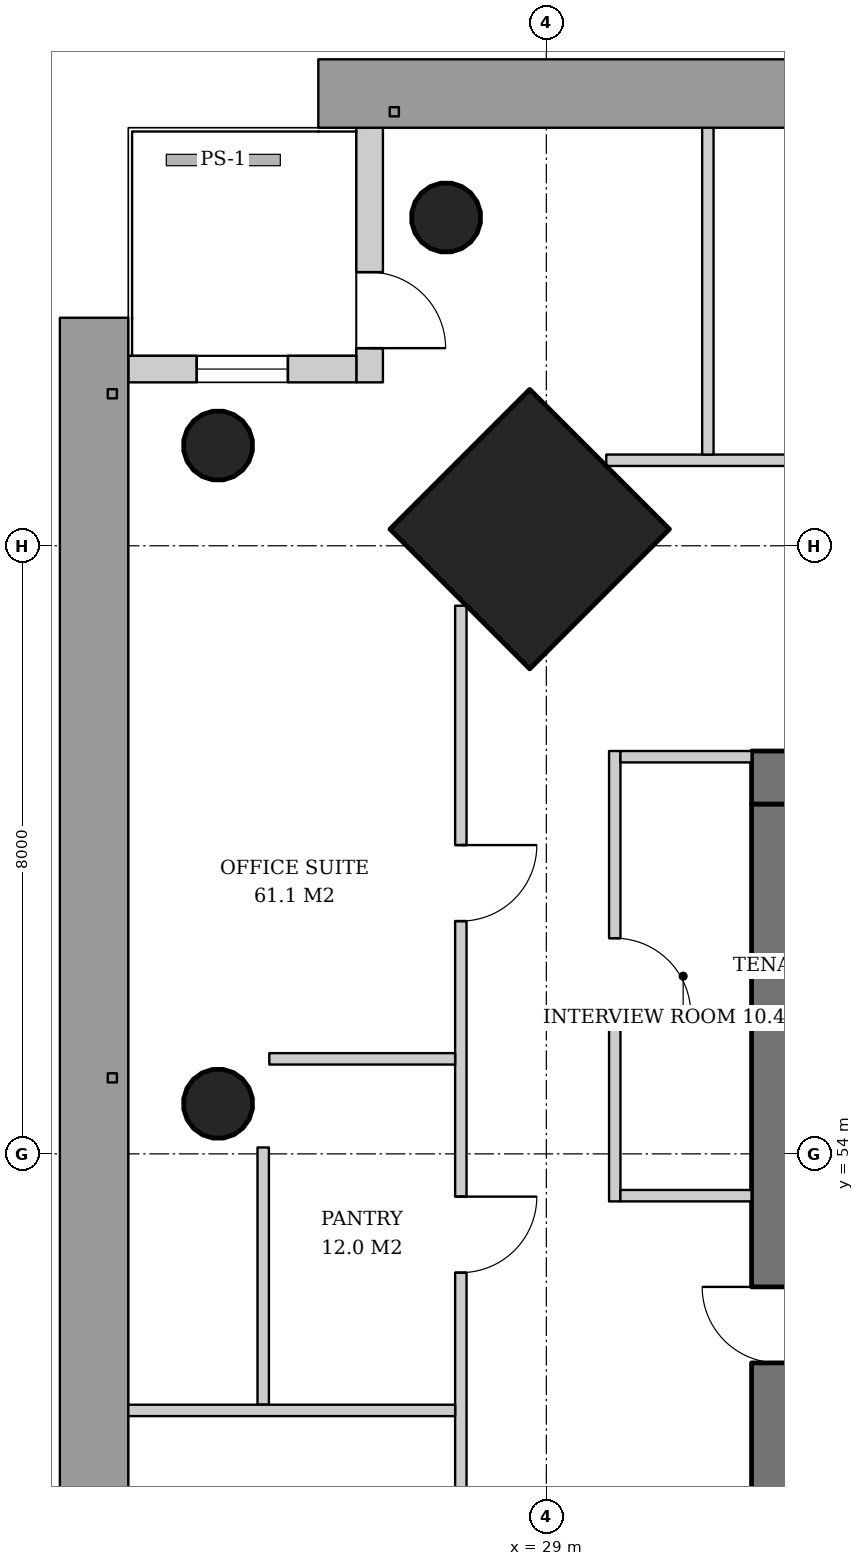
"""IFC4 building model, lengths in metres.
Left out: names, types, materials, properties, quantities, classifications, styles, units other than length and angle.
Written with IfcOpenShell. Run it as: python <this file> out.ifc"""

import sys

from ifc_helpers import new_model, si_unit, direction, frame, frame_2d, origin, origin_2d, place, context, subcontext, project, spatial, rectangle, hollow_circle, extrude, element, fill, save


model = new_model("IFC4")
c1 = context("Model", 3, precision=1e-05, world=origin(), true_north=direction((0.0, 1.0)))
c2 = subcontext(c1, "Body", "Model", "MODEL_VIEW")
j1 = project(units=[si_unit("LENGTHUNIT", "METRE"), si_unit("PLANEANGLEUNIT", "RADIAN")], contexts=[c1])
p1 = place(None, origin())
s1 = spatial("IfcSite", under=j1, at=p1, CompositionType="ELEMENT")
p2 = place(p1, origin())
s2 = spatial("IfcBuilding", under=s1, at=p2, CompositionType="ELEMENT")
p3 = place(p2, frame((0.0, 0.0, 135.0)))
s3 = spatial("IfcBuildingStorey", under=s2, at=p3, CompositionType="ELEMENT", Elevation=135.0)
p4 = place(p3, frame((28.743, 62.257, 0.0), z_axis=(0.031898107953, -0.031898107953, 0.998981992539), x_axis=(0.707106781187, 0.707106781187, 0.0)))
e1 = element("IfcColumn", 1, at=p4, inside=s3, PredefinedType="COLUMN", context=c2, shape_type="SweptSolid", body=[
    extrude(rectangle(XDim=2.6, YDim=2.6, at=origin_2d()), origin(), (0.0, 0.0, 1.0), 3.804),
])
for number, where, z_axis, x_axis in (
    (2, (27.643, 66.357, 0.0), (0.032, -0.032, 0.999), (0.707, 0.707, 0.0)),
    (3, (24.643, 63.357, 0.0), (0.032, -0.032, 0.999), (0.707, 0.707, 0.0)),
):
    element("IfcColumn", number, at=place(p3, frame(where, z_axis=z_axis, x_axis=x_axis)), inside=s3, PredefinedType="COLUMN", context=c2, shape_type="SweptSolid", body=[
        extrude(hollow_circle(Radius=0.457, WallThickness=0.03, at=origin_2d()), origin(), (0.0, 0.0, 1.0), 3.804),
    ])
p5 = place(p3, frame((24.643, 54.678, 0.0), z_axis=(0.031974442509, -0.015923015547, 0.999361842679), x_axis=(0.445775033553, 0.895145027055, 0.0)))
e4 = element("IfcColumn", 4, at=p5, inside=s3, PredefinedType="COLUMN", context=c2, shape_type="SweptSolid", body=[
    extrude(hollow_circle(Radius=0.457, WallThickness=0.03, at=origin_2d()), origin(), (0.0, 0.0, 1.0), 3.802),
])
p6 = place(p3, frame((31.7, 58.95, 0.0), z_axis=(0.0, 0.0, 1.0), x_axis=(1.0, 0.0, 0.0)))
e5 = element("IfcWall", 5, at=p6, inside=s3, PredefinedType="SHEAR", context=c2, shape_type="SweptSolid", body=[
    extrude(rectangle(XDim=26.6, YDim=0.7, at=frame_2d((13.3, 0.0))), origin(), (0.0, 0.0, 1.0), 3.8),
])
p7 = place(p6, frame((17.94, 0.0, 0.0)))
e6 = element("IfcOpeningElement", 6, at=p7, cuts=e5, PredefinedType="OPENING", context=c2, shape_type="SweptSolid", body=[
    extrude(rectangle(XDim=1.0, YDim=2.1, at=frame_2d((0.5, 1.05))), frame((0.0, 0.36, 0.0), z_axis=(0.0, -1.0, 0.0), x_axis=(1.0, 0.0, 0.0)), (0.0, 0.0, 1.0), 0.72),
])
p8 = place(p6, frame((5.825, 0.0, 0.0)))
e7 = element("IfcOpeningElement", 7, at=p8, cuts=e5, PredefinedType="OPENING", context=c2, shape_type="SweptSolid", body=[
    extrude(rectangle(XDim=1.0, YDim=2.1, at=frame_2d((0.5, 1.05))), frame((0.0, 0.36, 0.0), z_axis=(0.0, -1.0, 0.0), x_axis=(1.0, 0.0, 0.0)), (0.0, 0.0, 1.0), 0.72),
])
p9 = place(p6, frame((1.073, 0.0, 0.0)))
e8 = element("IfcOpeningElement", 8, at=p9, cuts=e5, PredefinedType="OPENING", context=c2, shape_type="SweptSolid", body=[
    extrude(rectangle(XDim=1.0, YDim=2.1, at=frame_2d((0.5, 1.05))), frame((0.0, 0.36, 0.0), z_axis=(0.0, -1.0, 0.0), x_axis=(1.0, 0.0, 0.0)), (0.0, 0.0, 1.0), 0.72),
])
p10 = place(p6, frame((2.611, 0.0, 0.0)))
e9 = element("IfcOpeningElement", 9, at=p10, cuts=e5, PredefinedType="OPENING", context=c2, shape_type="SweptSolid", body=[
    extrude(rectangle(XDim=1.0, YDim=2.1, at=frame_2d((0.5, 1.05))), frame((0.0, 0.36, 0.0), z_axis=(0.0, -1.0, 0.0), x_axis=(1.0, 0.0, 0.0)), (0.0, 0.0, 1.0), 0.72),
])
p11 = place(p6, frame((4.187, 0.0, 0.0)))
e10 = element("IfcOpeningElement", 10, at=p11, cuts=e5, PredefinedType="OPENING", context=c2, shape_type="SweptSolid", body=[
    extrude(rectangle(XDim=1.0, YDim=2.1, at=frame_2d((0.5, 1.05))), frame((0.0, 0.36, 0.0), z_axis=(0.0, -1.0, 0.0), x_axis=(1.0, 0.0, 0.0)), (0.0, 0.0, 1.0), 0.72),
])
p12 = place(p6, frame((8.44, 0.0, 0.0)))
e11 = element("IfcOpeningElement", 11, at=p12, cuts=e5, PredefinedType="OPENING", context=c2, shape_type="SweptSolid", body=[
    extrude(rectangle(XDim=1.0, YDim=2.1, at=frame_2d((0.5, 1.05))), frame((0.0, 0.36, 0.0), z_axis=(0.0, -1.0, 0.0), x_axis=(1.0, 0.0, 0.0)), (0.0, 0.0, 1.0), 0.72),
])
p13 = place(p6, frame((13.342, 0.0, 0.0)))
e12 = element("IfcOpeningElement", 12, at=p13, cuts=e5, PredefinedType="OPENING", context=c2, shape_type="SweptSolid", body=[
    extrude(rectangle(XDim=1.0, YDim=2.1, at=frame_2d((0.5, 1.05))), frame((0.0, 0.36, 0.0), z_axis=(0.0, -1.0, 0.0), x_axis=(1.0, 0.0, 0.0)), (0.0, 0.0, 1.0), 0.72),
])
p14 = place(p6, frame((22.4, 0.0, 0.0)))
e13 = element("IfcOpeningElement", 13, at=p14, cuts=e5, PredefinedType="OPENING", context=c2, shape_type="SweptSolid", body=[
    extrude(rectangle(XDim=1.0, YDim=2.1, at=frame_2d((0.5, 1.05))), frame((0.0, 0.36, 0.0), z_axis=(0.0, -1.0, 0.0), x_axis=(1.0, 0.0, 0.0)), (0.0, 0.0, 1.0), 0.72),
])
p15 = place(p3, frame((32.05, 33.4, 0.0), z_axis=(0.0, 0.0, 1.0), x_axis=(0.0, 1.0, 0.0)))
e14 = element("IfcWall", 14, at=p15, inside=s3, PredefinedType="SHEAR", context=c2, shape_type="SweptSolid", body=[
    extrude(rectangle(XDim=25.2, YDim=0.7, at=frame_2d((12.6, 0.0))), origin(), (0.0, 0.0, 1.0), 3.8),
])
p16 = place(p15, frame((11.7, 0.0, 0.0)))
e15 = element("IfcOpeningElement", 15, at=p16, cuts=e14, PredefinedType="OPENING", context=c2, shape_type="SweptSolid", body=[
    extrude(rectangle(XDim=1.8, YDim=2.4, at=frame_2d((0.9, 1.2))), frame((0.0, 0.36, 0.0), z_axis=(0.0, -1.0, 0.0), x_axis=(1.0, 0.0, 0.0)), (0.0, 0.0, 1.0), 0.72),
])
p17 = place(p15, frame((3.6, 0.0, 0.0)))
e16 = element("IfcOpeningElement", 16, at=p17, cuts=e14, PredefinedType="OPENING", context=c2, shape_type="SweptSolid", body=[
    extrude(rectangle(XDim=1.0, YDim=2.1, at=frame_2d((0.5, 1.05))), frame((0.0, 0.36, 0.0), z_axis=(0.0, -1.0, 0.0), x_axis=(1.0, 0.0, 0.0)), (0.0, 0.0, 1.0), 0.72),
])
p18 = place(p15, frame((6.35, 0.0, 0.0)))
e17 = element("IfcOpeningElement", 17, at=p18, cuts=e14, PredefinedType="OPENING", context=c2, shape_type="SweptSolid", body=[
    extrude(rectangle(XDim=1.0, YDim=2.1, at=frame_2d((0.5, 1.05))), frame((0.0, 0.36, 0.0), z_axis=(0.0, -1.0, 0.0), x_axis=(1.0, 0.0, 0.0)), (0.0, 0.0, 1.0), 0.72),
])
p19 = place(p15, frame((9.1, 0.0, 0.0)))
e18 = element("IfcOpeningElement", 18, at=p19, cuts=e14, PredefinedType="OPENING", context=c2, shape_type="SweptSolid", body=[
    extrude(rectangle(XDim=1.0, YDim=2.1, at=frame_2d((0.5, 1.05))), frame((0.0, 0.36, 0.0), z_axis=(0.0, -1.0, 0.0), x_axis=(1.0, 0.0, 0.0)), (0.0, 0.0, 1.0), 0.72),
])
p20 = place(p15, frame((15.1, 0.0, 0.0)))
e19 = element("IfcOpeningElement", 19, at=p20, cuts=e14, PredefinedType="OPENING", context=c2, shape_type="SweptSolid", body=[
    extrude(rectangle(XDim=1.0, YDim=2.1, at=frame_2d((0.5, 1.05))), frame((0.0, 0.36, 0.0), z_axis=(0.0, -1.0, 0.0), x_axis=(1.0, 0.0, 0.0)), (0.0, 0.0, 1.0), 0.72),
])
p21 = place(p15, frame((17.85, 0.0, 0.0)))
e20 = element("IfcOpeningElement", 20, at=p21, cuts=e14, PredefinedType="OPENING", context=c2, shape_type="SweptSolid", body=[
    extrude(rectangle(XDim=1.0, YDim=2.1, at=frame_2d((0.5, 1.05))), frame((0.0, 0.36, 0.0), z_axis=(0.0, -1.0, 0.0), x_axis=(1.0, 0.0, 0.0)), (0.0, 0.0, 1.0), 0.72),
])
p22 = place(p3, frame((26.675, 67.5, 0.0), z_axis=(0.0, 0.0, 1.0), x_axis=(0.0, -1.0, 0.0)))
e21 = element("IfcWall", 21, at=p22, inside=s3, PredefinedType="SOLIDWALL", context=c2, shape_type="SweptSolid", body=[
    extrude(rectangle(XDim=3.35, YDim=0.35, at=frame_2d((1.675, 0.0))), origin(), (0.0, 0.0, 1.0), 3.62),
])
p23 = place(p22, frame((1.9, 0.0, 0.0)))
e22 = element("IfcOpeningElement", 22, at=p23, cuts=e21, PredefinedType="OPENING", context=c2, shape_type="SweptSolid", body=[
    extrude(rectangle(XDim=1.0, YDim=2.4, at=frame_2d((0.5, 1.2))), frame((0.0, 0.185, 0.0), z_axis=(0.0, -1.0, 0.0), x_axis=(1.0, 0.0, 0.0)), (0.0, 0.0, 1.0), 0.37),
])
p24 = place(p3, frame((26.5, 64.325, 0.0), z_axis=(0.0, 0.0, 1.0), x_axis=(-1.0, 0.0, 0.0)))
e23 = element("IfcWall", 23, at=p24, inside=s3, PredefinedType="SOLIDWALL", context=c2, shape_type="SweptSolid", body=[
    extrude(rectangle(XDim=3.0, YDim=0.35, at=frame_2d((1.5, 0.0))), origin(), (0.0, 0.0, 1.0), 3.62),
])
p25 = place(p24, frame((0.9, 0.0, 0.6)))
e24 = element("IfcOpeningElement", 24, at=p25, cuts=e23, PredefinedType="OPENING", context=c2, shape_type="SweptSolid", body=[
    extrude(rectangle(XDim=1.2, YDim=2.55, at=frame_2d((0.6, 1.275))), frame((0.0, 0.185, 0.0), z_axis=(0.0, -1.0, 0.0), x_axis=(1.0, 0.0, 0.0)), (0.0, 0.0, 1.0), 0.37),
])
p26 = place(p3, frame((29.9, 59.3, 0.0), z_axis=(0.0, 0.0, 1.0), x_axis=(0.0, -1.0, 0.0)))
e25 = element("IfcWall", 25, at=p26, inside=s3, PredefinedType="PARTITIONING", context=c2, shape_type="SweptSolid", body=[
    extrude(rectangle(XDim=5.925, YDim=0.15, at=frame_2d((2.962, 0.0))), origin(), (0.0, 0.0, 1.0), 2.72),
])
p27 = place(p26, frame((2.462, 0.0, 0.0)))
e26 = element("IfcOpeningElement", 26, at=p27, cuts=e25, PredefinedType="OPENING", context=c2, shape_type="SweptSolid", body=[
    extrude(rectangle(XDim=1.0, YDim=2.1, at=frame_2d((0.5, 1.05))), frame((0.0, 0.085, 0.0), z_axis=(0.0, -1.0, 0.0), x_axis=(1.0, 0.0, 0.0)), (0.0, 0.0, 1.0), 0.17),
])
for number, where, z_axis, x_axis in (
    (27, (31.7, 59.225, 0.0), (0.0, 0.0, 1.0), (-1.0, 0.0, 0.0)),
    (28, (31.7, 53.45, 0.0), (0.0, 0.0, 1.0), (-1.0, 0.0, 0.0)),
):
    element("IfcWall", number, at=place(p3, frame(where, z_axis=z_axis, x_axis=x_axis)), inside=s3, PredefinedType="PARTITIONING", context=c2, shape_type="SweptSolid", body=[
        extrude(rectangle(XDim=1.725, YDim=0.15, at=frame_2d((0.862, 0.0))), origin(), (0.0, 0.0, 1.0), 3.62),
    ])
p28 = place(p3, frame((60.211, 63.125, 0.0), z_axis=(0.0, 0.0, 1.0), x_axis=(-1.0, 0.0, 0.0)))
e29 = element("IfcWall", 29, at=p28, inside=s3, PredefinedType="PARTITIONING", context=c2, shape_type="SweptSolid", body=[
    extrude(rectangle(XDim=30.423, YDim=0.15, at=frame_2d((15.211, 0.0))), origin(), (0.0, 0.0, 1.0), 2.72),
])
p29 = place(p28, frame((3.149, 0.0, 0.0)))
e30 = element("IfcOpeningElement", 30, at=p29, cuts=e29, PredefinedType="OPENING", context=c2, shape_type="SweptSolid", body=[
    extrude(rectangle(XDim=1.0, YDim=2.1, at=frame_2d((0.5, 1.05))), frame((0.0, 0.085, 0.0), z_axis=(0.0, -1.0, 0.0), x_axis=(1.0, 0.0, 0.0)), (0.0, 0.0, 1.0), 0.17),
])
p30 = place(p28, frame((7.774, 0.0, 0.0)))
e31 = element("IfcOpeningElement", 31, at=p30, cuts=e29, PredefinedType="OPENING", context=c2, shape_type="SweptSolid", body=[
    extrude(rectangle(XDim=1.0, YDim=2.1, at=frame_2d((0.5, 1.05))), frame((0.0, 0.085, 0.0), z_axis=(0.0, -1.0, 0.0), x_axis=(1.0, 0.0, 0.0)), (0.0, 0.0, 1.0), 0.17),
])
p31 = place(p28, frame((12.399, 0.0, 0.0)))
e32 = element("IfcOpeningElement", 32, at=p31, cuts=e29, PredefinedType="OPENING", context=c2, shape_type="SweptSolid", body=[
    extrude(rectangle(XDim=1.0, YDim=2.1, at=frame_2d((0.5, 1.05))), frame((0.0, 0.085, 0.0), z_axis=(0.0, -1.0, 0.0), x_axis=(1.0, 0.0, 0.0)), (0.0, 0.0, 1.0), 0.17),
])
p32 = place(p28, frame((17.024, 0.0, 0.0)))
e33 = element("IfcOpeningElement", 33, at=p32, cuts=e29, PredefinedType="OPENING", context=c2, shape_type="SweptSolid", body=[
    extrude(rectangle(XDim=1.0, YDim=2.1, at=frame_2d((0.5, 1.05))), frame((0.0, 0.085, 0.0), z_axis=(0.0, -1.0, 0.0), x_axis=(1.0, 0.0, 0.0)), (0.0, 0.0, 1.0), 0.17),
])
p33 = place(p28, frame((21.649, 0.0, 0.0)))
e34 = element("IfcOpeningElement", 34, at=p33, cuts=e29, PredefinedType="OPENING", context=c2, shape_type="SweptSolid", body=[
    extrude(rectangle(XDim=1.0, YDim=2.1, at=frame_2d((0.5, 1.05))), frame((0.0, 0.085, 0.0), z_axis=(0.0, -1.0, 0.0), x_axis=(1.0, 0.0, 0.0)), (0.0, 0.0, 1.0), 0.17),
])
p34 = place(p28, frame((26.274, 0.0, 0.0)))
e35 = element("IfcOpeningElement", 35, at=p34, cuts=e29, PredefinedType="OPENING", context=c2, shape_type="SweptSolid", body=[
    extrude(rectangle(XDim=1.0, YDim=2.1, at=frame_2d((0.5, 1.05))), frame((0.0, 0.085, 0.0), z_axis=(0.0, -1.0, 0.0), x_axis=(1.0, 0.0, 0.0)), (0.0, 0.0, 1.0), 0.17),
])
p35 = place(p3, frame((31.125, 63.2, 0.0), z_axis=(0.0, 0.0, 1.0), x_axis=(0.0, 1.0, 0.0)))
e36 = element("IfcWall", 36, at=p35, inside=s3, PredefinedType="PARTITIONING", context=c2, shape_type="SweptSolid", body=[
    extrude(rectangle(XDim=4.34, YDim=0.15, at=frame_2d((2.17, 0.0))), origin(), (0.0, 0.0, 1.0), 2.82),
])
p36 = place(p3, frame((25.275, 54.084, 0.0), z_axis=(0.0, 0.0, 1.0), x_axis=(0.0, -1.0, 0.0)))
e37 = element("IfcWall", 37, at=p36, inside=s3, PredefinedType="PARTITIONING", context=c2, shape_type="SweptSolid", body=[
    extrude(rectangle(XDim=3.384, YDim=0.15, at=frame_2d((1.692, 0.0))), origin(), (0.0, 0.0, 1.0), 2.858),
])
p37 = place(p3, frame((27.875, 61.211, 0.0), z_axis=(0.0, 0.0, 1.0), x_axis=(0.0, -1.0, 0.0)))
e38 = element("IfcWall", 38, at=p37, inside=s3, PredefinedType="PARTITIONING", context=c2, shape_type="SweptSolid", body=[
    extrude(rectangle(XDim=30.423, YDim=0.15, at=frame_2d((15.211, 0.0))), origin(), (0.0, 0.0, 1.0), 2.72),
])
p38 = place(p37, frame((3.149, 0.0, 0.0)))
e39 = element("IfcOpeningElement", 39, at=p38, cuts=e38, PredefinedType="OPENING", context=c2, shape_type="SweptSolid", body=[
    extrude(rectangle(XDim=1.0, YDim=2.1, at=frame_2d((0.5, 1.05))), frame((0.0, 0.085, 0.0), z_axis=(0.0, -1.0, 0.0), x_axis=(1.0, 0.0, 0.0)), (0.0, 0.0, 1.0), 0.17),
])
p39 = place(p37, frame((7.774, 0.0, 0.0)))
e40 = element("IfcOpeningElement", 40, at=p39, cuts=e38, PredefinedType="OPENING", context=c2, shape_type="SweptSolid", body=[
    extrude(rectangle(XDim=1.0, YDim=2.1, at=frame_2d((0.5, 1.05))), frame((0.0, 0.085, 0.0), z_axis=(0.0, -1.0, 0.0), x_axis=(1.0, 0.0, 0.0)), (0.0, 0.0, 1.0), 0.17),
])
p40 = place(p37, frame((12.399, 0.0, 0.0)))
e41 = element("IfcOpeningElement", 41, at=p40, cuts=e38, PredefinedType="OPENING", context=c2, shape_type="SweptSolid", body=[
    extrude(rectangle(XDim=1.0, YDim=2.1, at=frame_2d((0.5, 1.05))), frame((0.0, 0.085, 0.0), z_axis=(0.0, -1.0, 0.0), x_axis=(1.0, 0.0, 0.0)), (0.0, 0.0, 1.0), 0.17),
])
p41 = place(p37, frame((17.124, 0.0, 0.0)))
e42 = element("IfcOpeningElement", 42, at=p41, cuts=e38, PredefinedType="OPENING", context=c2, shape_type="SweptSolid", body=[
    extrude(rectangle(XDim=0.8, YDim=2.1, at=frame_2d((0.4, 1.05))), frame((0.0, 0.085, 0.0), z_axis=(0.0, -1.0, 0.0), x_axis=(1.0, 0.0, 0.0)), (0.0, 0.0, 1.0), 0.17),
])
p42 = place(p37, frame((21.649, 0.0, 0.0)))
e43 = element("IfcOpeningElement", 43, at=p42, cuts=e38, PredefinedType="OPENING", context=c2, shape_type="SweptSolid", body=[
    extrude(rectangle(XDim=1.0, YDim=2.1, at=frame_2d((0.5, 1.05))), frame((0.0, 0.085, 0.0), z_axis=(0.0, -1.0, 0.0), x_axis=(1.0, 0.0, 0.0)), (0.0, 0.0, 1.0), 0.17),
])
p43 = place(p37, frame((26.374, 0.0, 0.0)))
e44 = element("IfcOpeningElement", 44, at=p43, cuts=e38, PredefinedType="OPENING", context=c2, shape_type="SweptSolid", body=[
    extrude(rectangle(XDim=0.8, YDim=2.1, at=frame_2d((0.4, 1.05))), frame((0.0, 0.085, 0.0), z_axis=(0.0, -1.0, 0.0), x_axis=(1.0, 0.0, 0.0)), (0.0, 0.0, 1.0), 0.17),
])
p44 = place(p3, frame((27.8, 55.25, 0.0), z_axis=(0.0, 0.0, 1.0), x_axis=(-1.0, 0.0, 0.0)))
e45 = element("IfcWall", 45, at=p44, inside=s3, PredefinedType="PARTITIONING", context=c2, shape_type="SweptSolid", body=[
    extrude(rectangle(XDim=2.445, YDim=0.15, at=frame_2d((1.222, 0.0))), origin(), (0.0, 0.0, 1.0), 3.62),
])
p45 = place(p3, frame((27.8, 50.625, 0.0), z_axis=(0.0, 0.0, 1.0), x_axis=(-1.0, 0.0, 0.0)))
e46 = element("IfcWall", 46, at=p45, inside=s3, PredefinedType="PARTITIONING", context=c2, shape_type="SweptSolid", body=[
    extrude(rectangle(XDim=4.34, YDim=0.15, at=frame_2d((2.17, 0.0))), origin(), (0.0, 0.0, 1.0), 2.82),
])
p46 = place(p23, origin())
e47 = element("IfcDoor", 47, at=p46, inside=s3, OperationType="SINGLE_SWING_RIGHT", PredefinedType="DOOR", context=c2, shape_type="SweptSolid", body=[
    extrude(rectangle(XDim=1.0, YDim=2.4, at=frame_2d((0.5, 1.2))), frame((0.0, 0.025, 0.0), z_axis=(0.0, -1.0, 0.0), x_axis=(1.0, 0.0, 0.0)), (0.0, 0.0, 1.0), 0.05),
])
fill(e22, e47)
p47 = place(p25, origin())
e48 = element("IfcWindow", 48, at=p47, inside=s3, PartitioningType="SINGLE_PANEL", PredefinedType="WINDOW", context=c2, shape_type="SweptSolid", body=[
    extrude(rectangle(XDim=1.2, YDim=2.55, at=frame_2d((0.6, 1.275))), frame((0.0, 0.03, 0.0), z_axis=(0.0, -1.0, 0.0), x_axis=(1.0, 0.0, 0.0)), (0.0, 0.0, 1.0), 0.06),
])
fill(e24, e48)
p48 = place(p27, origin())
e49 = element("IfcDoor", 49, at=p48, inside=s3, OperationType="SINGLE_SWING_RIGHT", PredefinedType="DOOR", context=c2, shape_type="SweptSolid", body=[
    extrude(rectangle(XDim=1.0, YDim=2.1, at=frame_2d((0.5, 1.05))), frame((0.0, 0.025, 0.0), z_axis=(0.0, -1.0, 0.0), x_axis=(1.0, 0.0, 0.0)), (0.0, 0.0, 1.0), 0.05),
])
fill(e26, e49)
p49 = place(p38, origin())
e50 = element("IfcDoor", 50, at=p49, inside=s3, OperationType="SINGLE_SWING_LEFT", PredefinedType="DOOR", context=c2, shape_type="SweptSolid", body=[
    extrude(rectangle(XDim=1.0, YDim=2.1, at=frame_2d((0.5, 1.05))), frame((0.0, 0.025, 0.0), z_axis=(0.0, -1.0, 0.0), x_axis=(1.0, 0.0, 0.0)), (0.0, 0.0, 1.0), 0.05),
])
fill(e39, e50)
p50 = place(p39, origin())
e51 = element("IfcDoor", 51, at=p50, inside=s3, OperationType="SINGLE_SWING_LEFT", PredefinedType="DOOR", context=c2, shape_type="SweptSolid", body=[
    extrude(rectangle(XDim=1.0, YDim=2.1, at=frame_2d((0.5, 1.05))), frame((0.0, 0.025, 0.0), z_axis=(0.0, -1.0, 0.0), x_axis=(1.0, 0.0, 0.0)), (0.0, 0.0, 1.0), 0.05),
])
fill(e40, e51)
save(model, sys.argv[1])
